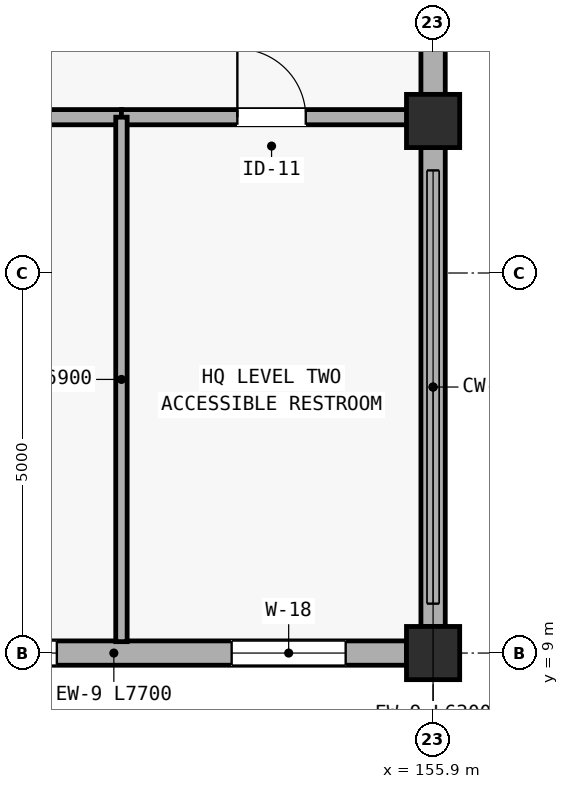
"""IFC4 building model, lengths in metres.
Left out: names, types, materials, properties, quantities, classifications, styles, units other than length and angle.
Written with IfcOpenShell. Run it as: python <this file> out.ifc"""

import sys

from ifc_helpers import new_model, si_unit, direction, frame, frame_2d, origin, origin_2d, place, context, subcontext, project, spatial, rectangle, extrude, element, fill, save


model = new_model("IFC4")
c1 = context("Model", 3, precision=1e-05, world=origin(), true_north=direction((0.0, 1.0)))
c2 = subcontext(c1, "Body", "Model", "MODEL_VIEW")
j1 = project(units=[si_unit("LENGTHUNIT", "METRE"), si_unit("PLANEANGLEUNIT", "RADIAN")], contexts=[c1])
p1 = place(None, origin())
s1 = spatial("IfcSite", under=j1, at=p1, CompositionType="ELEMENT")
p2 = place(p1, origin())
s2 = spatial("IfcBuilding", under=s1, at=p2, CompositionType="ELEMENT")
p3 = place(p2, frame((0.0, 0.0, 5.85)))
s3 = spatial("IfcBuildingStorey", under=s2, at=p3, CompositionType="ELEMENT", Elevation=5.85)
for number, where, z_axis, x_axis in (
    (1, (155.9, 9.0, 0.0), (0.0, 0.0, 1.0), (1.0, 0.0, 0.0)),
    (2, (155.9, 16.0, 0.0), (0.0, 0.0, 1.0), (1.0, 0.0, 0.0)),
):
    element("IfcColumn", number, at=place(p3, frame(where, z_axis=z_axis, x_axis=x_axis)), inside=s3, PredefinedType="COLUMN", context=c2, shape_type="SweptSolid", body=[
        extrude(rectangle(XDim=0.7, YDim=0.7, at=origin_2d()), origin(), (0.0, 0.0, 1.0), 3.45),
    ])
p4 = place(p3, frame((147.85, 9.0, 0.0), z_axis=(0.0, 0.0, 1.0), x_axis=(1.0, 0.0, 0.0)))
e3 = element("IfcWall", 3, at=p4, inside=s3, PredefinedType="STANDARD", context=c2, shape_type="SweptSolid", body=[
    extrude(rectangle(XDim=7.7, YDim=0.32, at=frame_2d((3.85, 0.0))), origin(), (0.0, 0.0, 1.0), 2.64),
])
p5 = place(p4, frame((0.9, 0.0, 0.75)))
e4 = element("IfcOpeningElement", 4, at=p5, cuts=e3, PredefinedType="OPENING", context=c2, shape_type="SweptSolid", body=[
    extrude(rectangle(XDim=2.2, YDim=1.45, at=frame_2d((1.1, 0.725))), frame((0.0, 0.17, 0.0), z_axis=(0.0, -1.0, 0.0), x_axis=(1.0, 0.0, 0.0)), (0.0, 0.0, 1.0), 0.34),
])
p6 = place(p4, frame((5.4, 0.0, 0.75)))
e5 = element("IfcOpeningElement", 5, at=p6, cuts=e3, PredefinedType="OPENING", context=c2, shape_type="SweptSolid", body=[
    extrude(rectangle(XDim=1.5, YDim=1.4, at=frame_2d((0.75, 0.7))), frame((0.0, 0.17, 0.0), z_axis=(0.0, -1.0, 0.0), x_axis=(1.0, 0.0, 0.0)), (0.0, 0.0, 1.0), 0.34),
])
p7 = place(p3, frame((155.9, 9.35, 0.0), z_axis=(0.0, 0.0, 1.0), x_axis=(0.0, 1.0, 0.0)))
e6 = element("IfcWall", 6, at=p7, inside=s3, PredefinedType="STANDARD", context=c2, shape_type="SweptSolid", body=[
    extrude(rectangle(XDim=6.3, YDim=0.32, at=frame_2d((3.15, 0.0))), origin(), (0.0, 0.0, 1.0), 2.7),
])
p8 = place(p3, frame((155.9, 16.35, 0.0), z_axis=(0.0, 0.0, 1.0), x_axis=(0.0, 1.0, 0.0)))
e7 = element("IfcWall", 7, at=p8, inside=s3, PredefinedType="STANDARD", context=c2, shape_type="SweptSolid", body=[
    extrude(rectangle(XDim=7.8, YDim=0.32, at=frame_2d((3.9, 0.0))), origin(), (0.0, 0.0, 1.0), 2.7),
])
p9 = place(p8, frame((3.9, 0.0, 0.75)))
e8 = element("IfcOpeningElement", 8, at=p9, cuts=e7, PredefinedType="OPENING", context=c2, shape_type="SweptSolid", body=[
    extrude(rectangle(XDim=1.75, YDim=1.55, at=frame_2d((0.875, 0.775))), frame((0.0, 0.17, 0.0), z_axis=(0.0, -1.0, 0.0), x_axis=(1.0, 0.0, 0.0)), (0.0, 0.0, 1.0), 0.34),
])
p10 = place(p3, frame((147.5, 16.05, 0.0), z_axis=(0.0, 0.0, 1.0), x_axis=(1.0, 0.0, 0.0)))
e9 = element("IfcWall", 9, at=p10, inside=s3, PredefinedType="PARTITIONING", context=c2, shape_type="SweptSolid", body=[
    extrude(rectangle(XDim=4.3, YDim=0.2, at=frame_2d((2.15, 0.0))), origin(), (0.0, 0.0, 1.0), 2.65),
])
p11 = place(p3, frame((151.8, 16.05, 0.0), z_axis=(0.0, 0.0, 1.0), x_axis=(1.0, 0.0, 0.0)))
e10 = element("IfcWall", 10, at=p11, inside=s3, PredefinedType="PARTITIONING", context=c2, shape_type="SweptSolid", body=[
    extrude(rectangle(XDim=3.95, YDim=0.2, at=frame_2d((1.975, 0.0))), origin(), (0.0, 0.0, 1.0), 2.65),
])
p12 = place(p11, frame((1.525, 0.0, 0.0)))
e11 = element("IfcOpeningElement", 11, at=p12, cuts=e10, PredefinedType="OPENING", context=c2, shape_type="SweptSolid", body=[
    extrude(rectangle(XDim=0.9, YDim=2.08, at=frame_2d((0.45, 1.04))), frame((0.0, 0.11, 0.0), z_axis=(0.0, -1.0, 0.0), x_axis=(1.0, 0.0, 0.0)), (0.0, 0.0, 1.0), 0.22),
])
p13 = place(p3, frame((151.8, 9.15, 0.0), z_axis=(0.0, 0.0, 1.0), x_axis=(0.0, 1.0, 0.0)))
e12 = element("IfcWall", 12, at=p13, inside=s3, PredefinedType="PARTITIONING", context=c2, shape_type="SweptSolid", body=[
    extrude(rectangle(XDim=6.9, YDim=0.15, at=frame_2d((3.45, 0.0))), origin(), (0.0, 0.0, 1.0), 2.65),
])
p14 = place(p5, origin())
e13 = element("IfcWindow", 13, at=p14, inside=s3, PartitioningType="TRIPLE_PANEL_VERTICAL", PredefinedType="WINDOW", context=c2, shape_type="SweptSolid", body=[
    extrude(rectangle(XDim=2.2, YDim=1.45, at=frame_2d((1.1, 0.725))), frame((0.0, 0.03, 0.0), z_axis=(0.0, -1.0, 0.0), x_axis=(1.0, 0.0, 0.0)), (0.0, 0.0, 1.0), 0.06),
])
fill(e4, e13)
p15 = place(p6, origin())
e14 = element("IfcWindow", 14, at=p15, inside=s3, PartitioningType="DOUBLE_PANEL_VERTICAL", PredefinedType="WINDOW", context=c2, shape_type="SweptSolid", body=[
    extrude(rectangle(XDim=1.5, YDim=1.4, at=frame_2d((0.75, 0.7))), frame((0.0, 0.03, 0.0), z_axis=(0.0, -1.0, 0.0), x_axis=(1.0, 0.0, 0.0)), (0.0, 0.0, 1.0), 0.06),
])
fill(e5, e14)
p16 = place(p12, origin())
e15 = element("IfcDoor", 15, at=p16, inside=s3, OperationType="SINGLE_SWING_LEFT", PredefinedType="DOOR", context=c2, shape_type="SweptSolid", body=[
    extrude(rectangle(XDim=0.9, YDim=2.08, at=frame_2d((0.45, 1.04))), frame((0.0, 0.025, 0.0), z_axis=(0.0, -1.0, 0.0), x_axis=(1.0, 0.0, 0.0)), (0.0, 0.0, 1.0), 0.05),
])
fill(e11, e15)
save(model, sys.argv[1])
